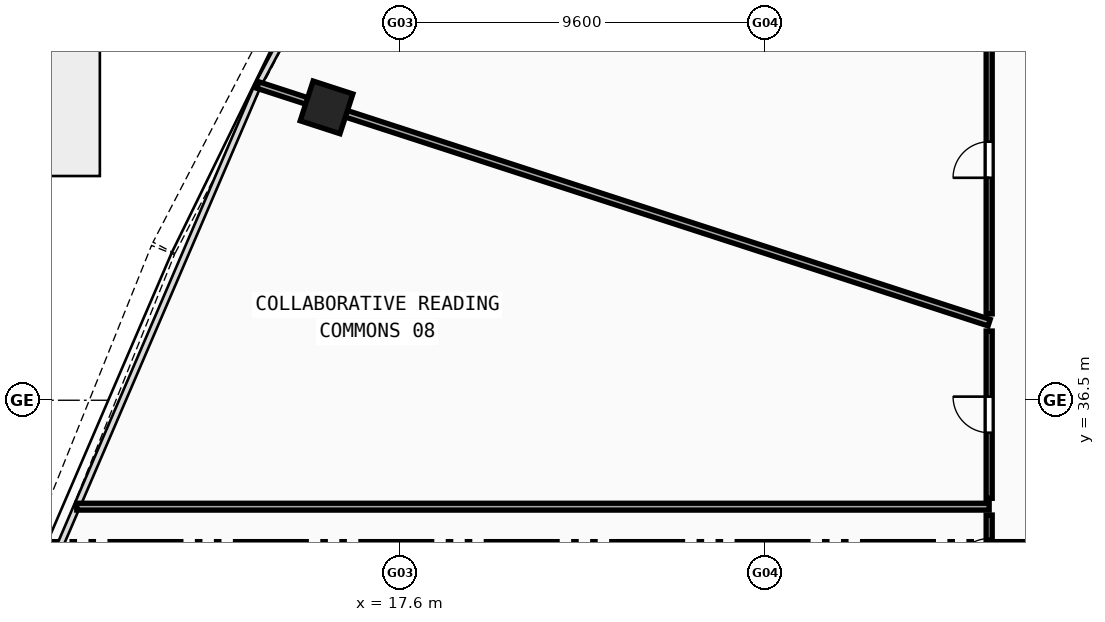
"""IFC4 building model, lengths in metres.
Left out: names, types, materials, properties, quantities, classifications, styles, units other than length and angle.
Written with IfcOpenShell. Run it as: python <this file> out.ifc"""

import sys

from ifc_helpers import new_model, si_unit, direction, frame, frame_2d, origin, origin_with_axes, origin_2d, place, context, subcontext, project, spatial, rectangle, hollow_rectangle, extrude, source, transform, mapped, element, fill, save


model = new_model("IFC4")
c1 = context("Model", 3, precision=1e-05, world=origin(), true_north=direction((0.0, 1.0)))
c2 = subcontext(c1, "Body", "Model", "MODEL_VIEW")
j1 = project(units=[si_unit("LENGTHUNIT", "METRE"), si_unit("PLANEANGLEUNIT", "RADIAN")], contexts=[c1])
p1 = place(None, origin())
s1 = spatial("IfcSite", under=j1, at=p1, CompositionType="ELEMENT")
p2 = place(p1, origin())
s2 = spatial("IfcBuilding", under=s1, at=p2, CompositionType="ELEMENT")
p3 = place(p2, frame((0.0, 0.0, 30.4)))
s3 = spatial("IfcBuildingStorey", under=s2, at=p3, CompositionType="ELEMENT", Elevation=30.4)
m1 = source(origin(), c2, "Body", "SweptSolid", [
    extrude(hollow_rectangle(XDim=1.1, YDim=1.1, WallThickness=0.045, at=origin_2d()), origin(), (0.0, 0.0, 1.0), 3.63),
])
p4 = place(p3, frame((15.665, 44.206, -0.26), z_axis=(0.0, 0.0, 1.0), x_axis=(-0.309016994375, -0.951056516295, 0.0)))
e1 = element("IfcColumn", 1, at=p4, inside=s3, PredefinedType="COLUMN", context=c2, shape_type="MappedRepresentation", body=[
    mapped(m1, transform((0.0, 0.0, 0.0), scale=1.0)),
])
p5 = place(p3, frame((33.1, 38.541, 0.0), z_axis=(0.0, 0.0, 1.0), x_axis=(-0.951056237035, 0.309017853848, 0.0)))
e2 = element("IfcWall", 2, at=p5, inside=s3, PredefinedType="PARTITIONING", context=c2, shape_type="SweptSolid", body=[
    extrude(rectangle(XDim=20.231, YDim=0.18, at=frame_2d((10.115, 0.0))), origin(), (0.0, 0.0, 1.0), 2.67),
])
p6 = place(p3, frame((33.1, 33.7, 0.0), z_axis=(0.0, 0.0, 1.0), x_axis=(-1.0, 0.0, 0.0)))
e3 = element("IfcWall", 3, at=p6, inside=s3, PredefinedType="PARTITIONING", context=c2, shape_type="SweptSolid", body=[
    extrude(rectangle(XDim=24.008, YDim=0.18, at=frame_2d((12.004, 0.0))), origin(), (0.0, 0.0, 1.0), 2.67),
])
p7 = place(p3, frame((33.1, 31.292, 0.0), z_axis=(0.0, 0.0, 1.0), x_axis=(0.0, 1.0, 0.0)))
e4 = element("IfcWall", 4, at=p7, inside=s3, PredefinedType="PARTITIONING", context=c2, shape_type="SweptSolid", body=[
    extrude(rectangle(XDim=2.188, YDim=0.16, at=frame_2d((1.094, 0.0))), origin(), (0.0, 0.0, 1.0), 3.37),
])
p8 = place(p7, frame((0.619, 0.0, 0.0)))
e5 = element("IfcOpeningElement", 5, at=p8, cuts=e4, PredefinedType="OPENING", context=c2, shape_type="SweptSolid", body=[
    extrude(rectangle(XDim=0.95, YDim=2.1, at=frame_2d((0.475, 1.05))), frame((0.0, 0.09, 0.0), z_axis=(0.0, -1.0, 0.0), x_axis=(1.0, 0.0, 0.0)), (0.0, 0.0, 1.0), 0.18),
])
p9 = place(p3, frame((33.1, 33.92, 0.0), z_axis=(0.0, 0.0, 1.0), x_axis=(0.0, 1.0, 0.0)))
e6 = element("IfcWall", 6, at=p9, inside=s3, PredefinedType="PARTITIONING", context=c2, shape_type="SweptSolid", body=[
    extrude(rectangle(XDim=4.402, YDim=0.16, at=frame_2d((2.201, 0.0))), origin(), (0.0, 0.0, 1.0), 3.37),
])
p10 = place(p9, frame((1.726, 0.0, 0.0)))
e7 = element("IfcOpeningElement", 7, at=p10, cuts=e6, PredefinedType="OPENING", context=c2, shape_type="SweptSolid", body=[
    extrude(rectangle(XDim=0.95, YDim=2.1, at=frame_2d((0.475, 1.05))), frame((0.0, 0.09, 0.0), z_axis=(0.0, -1.0, 0.0), x_axis=(1.0, 0.0, 0.0)), (0.0, 0.0, 1.0), 0.18),
])
p11 = place(p3, frame((33.1, 38.773, 0.0), z_axis=(0.0, 0.0, 1.0), x_axis=(0.0, 1.0, 0.0)))
e8 = element("IfcWall", 8, at=p11, inside=s3, PredefinedType="PARTITIONING", context=c2, shape_type="SweptSolid", body=[
    extrude(rectangle(XDim=8.124, YDim=0.16, at=frame_2d((4.062, 0.0))), origin(), (0.0, 0.0, 1.0), 2.67),
])
p12 = place(p11, frame((3.581, 0.0, 0.0)))
e9 = element("IfcOpeningElement", 9, at=p12, cuts=e8, PredefinedType="OPENING", context=c2, shape_type="SweptSolid", body=[
    extrude(rectangle(XDim=0.95, YDim=2.1, at=frame_2d((0.475, 1.05))), frame((0.0, 0.09, 0.0), z_axis=(0.0, -1.0, 0.0), x_axis=(1.0, 0.0, 0.0)), (0.0, 0.0, 1.0), 0.18),
])
m2 = source(origin(), c2, "Body", "SweptSolid", [
    extrude(rectangle(XDim=0.95, YDim=2.1, at=frame_2d((0.475, 1.05))), frame((0.0, 0.025, 0.0), z_axis=(0.0, -1.0, 0.0), x_axis=(1.0, 0.0, 0.0)), (0.0, 0.0, 1.0), 0.05),
])
p13 = place(p12, origin_with_axes())
e10 = element("IfcDoor", 10, at=p13, inside=s3, OperationType="SINGLE_SWING_LEFT", PredefinedType="DOOR", context=c2, shape_type="MappedRepresentation", body=[
    mapped(m2, transform((0.0, 0.0, 0.0), scale=1.0)),
])
fill(e9, e10)
p14 = place(p10, origin_with_axes())
e11 = element("IfcDoor", 11, at=p14, inside=s3, OperationType="SINGLE_SWING_RIGHT", PredefinedType="DOOR", context=c2, shape_type="MappedRepresentation", body=[
    mapped(m2, transform((0.0, 0.0, 0.0), scale=1.0)),
])
fill(e7, e11)
p15 = place(p8, origin_with_axes())
e12 = element("IfcDoor", 12, at=p15, inside=s3, OperationType="SINGLE_SWING_LEFT", PredefinedType="DOOR", context=c2, shape_type="MappedRepresentation", body=[
    mapped(m2, transform((0.0, 0.0, 0.0), scale=1.0)),
])
fill(e5, e12)
save(model, sys.argv[1])
